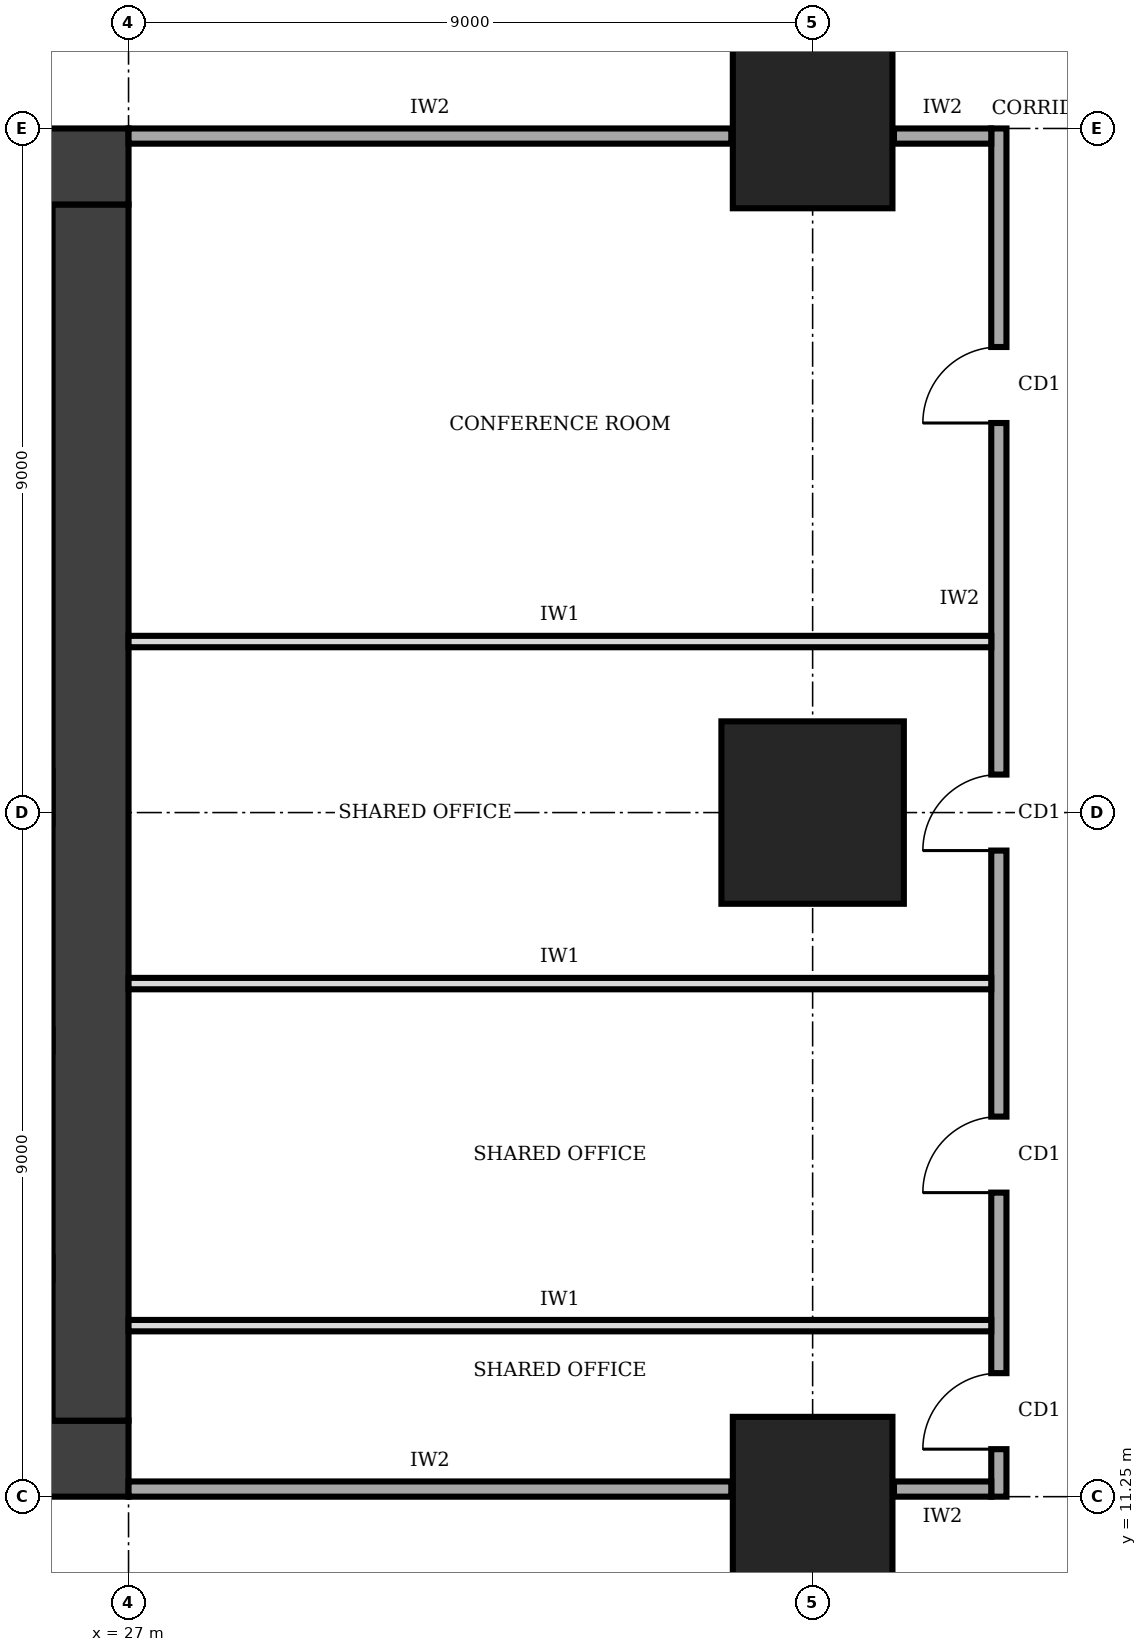
"""IFC4 building model, lengths in metres.
Left out: names, types, materials, properties, quantities, classifications, styles, units other than length and angle.
Written with IfcOpenShell. Run it as: python <this file> out.ifc"""

import sys

from ifc_helpers import new_model, si_unit, direction, frame, frame_2d, origin, origin_2d, place, context, subcontext, project, spatial, rectangle, extrude, element, fill, save


model = new_model("IFC4")
c1 = context("Model", 3, precision=1e-05, world=origin(), true_north=direction((0.0, 1.0)))
c2 = subcontext(c1, "Body", "Model", "MODEL_VIEW")
j1 = project(units=[si_unit("LENGTHUNIT", "METRE"), si_unit("PLANEANGLEUNIT", "RADIAN")], contexts=[c1])
p1 = place(None, origin())
s1 = spatial("IfcSite", under=j1, at=p1, CompositionType="ELEMENT")
p2 = place(p1, origin())
s2 = spatial("IfcBuilding", under=s1, at=p2, CompositionType="ELEMENT")
p3 = place(p2, frame((0.0, 0.0, 157.0)))
s3 = spatial("IfcBuildingStorey", under=s2, at=p3, CompositionType="ELEMENT", Elevation=157.0)
p4 = place(p3, frame((13.5, 11.75, 0.0), z_axis=(0.0, 0.0, 1.0), x_axis=(1.0, 0.0, 0.0)))
e1 = element("IfcWall", 1, at=p4, inside=s3, PredefinedType="SHEAR", context=c2, shape_type="SweptSolid", body=[
    extrude(rectangle(XDim=13.5, YDim=1.0, at=frame_2d((6.75, 0.0))), origin(), (0.0, 0.0, 1.0), 4.0),
])
p5 = place(p4, frame((4.75, 0.0, 0.0)))
e2 = element("IfcOpeningElement", 2, at=p5, cuts=e1, PredefinedType="OPENING", context=c2, shape_type="SweptSolid", body=[
    extrude(rectangle(XDim=1.0, YDim=2.1, at=frame_2d((0.5, 1.05))), frame((0.0, 0.51, 0.0), z_axis=(0.0, -1.0, 0.0), x_axis=(1.0, 0.0, 0.0)), (0.0, 0.0, 1.0), 1.02),
])
p6 = place(p3, frame((26.5, 12.25, 0.0), z_axis=(0.0, 0.0, 1.0), x_axis=(0.0, 1.0, 0.0)))
e3 = element("IfcWall", 3, at=p6, inside=s3, PredefinedType="SHEAR", context=c2, shape_type="SweptSolid", body=[
    extrude(rectangle(XDim=16.0, YDim=1.0, at=frame_2d((8.0, 0.0))), origin(), (0.0, 0.0, 1.0), 4.0),
])
p7 = place(p3, frame((27.0, 28.75, 0.0), z_axis=(0.0, 0.0, 1.0), x_axis=(-1.0, 0.0, 0.0)))
e4 = element("IfcWall", 4, at=p7, inside=s3, PredefinedType="SHEAR", context=c2, shape_type="SweptSolid", body=[
    extrude(rectangle(XDim=13.5, YDim=1.0, at=frame_2d((6.75, 0.0))), origin(), (0.0, 0.0, 1.0), 4.0),
])
p8 = place(p7, frame((4.75, 0.0, 0.0)))
e5 = element("IfcOpeningElement", 5, at=p8, cuts=e4, PredefinedType="OPENING", context=c2, shape_type="SweptSolid", body=[
    extrude(rectangle(XDim=1.8, YDim=2.1, at=frame_2d((0.9, 1.05))), frame((0.0, 0.51, 0.0), z_axis=(0.0, -1.0, 0.0), x_axis=(1.0, 0.0, 0.0)), (0.0, 0.0, 1.0), 1.02),
])
p9 = place(p3, frame((36.0, 11.25, 0.0), z_axis=(0.0, 0.0, 1.0), x_axis=(1.0, 0.0, 0.0)))
e6 = element("IfcColumn", 6, at=p9, inside=s3, PredefinedType="COLUMN", context=c2, shape_type="SweptSolid", body=[
    extrude(rectangle(XDim=2.1, YDim=2.1, at=origin_2d()), origin(), (0.0, 0.0, 1.0), 4.0),
])
p10 = place(p3, frame((36.0, 20.25, 0.0), z_axis=(0.0, 0.0, 1.0), x_axis=(1.0, 0.0, 0.0)))
e7 = element("IfcColumn", 7, at=p10, inside=s3, PredefinedType="COLUMN", context=c2, shape_type="SweptSolid", body=[
    extrude(rectangle(XDim=2.4, YDim=2.4, at=origin_2d()), origin(), (0.0, 0.0, 1.0), 4.0),
])
p11 = place(p3, frame((36.0, 29.25, 0.0), z_axis=(0.0, 0.0, 1.0), x_axis=(1.0, 0.0, 0.0)))
e8 = element("IfcColumn", 8, at=p11, inside=s3, PredefinedType="COLUMN", context=c2, shape_type="SweptSolid", body=[
    extrude(rectangle(XDim=2.1, YDim=2.1, at=origin_2d()), origin(), (0.0, 0.0, 1.0), 4.0),
])
p12 = place(p3, frame((38.45, 11.25, 0.0), z_axis=(0.0, 0.0, 1.0), x_axis=(0.0, 1.0, 0.0)))
e9 = element("IfcWall", 9, at=p12, inside=s3, PredefinedType="SOLIDWALL", context=c2, shape_type="SweptSolid", body=[
    extrude(rectangle(XDim=18.0, YDim=0.2, at=frame_2d((9.0, 0.0))), origin(), (0.0, 0.0, 1.0), 3.75),
])
p13 = place(p12, frame((0.625, 0.0, 0.0)))
e10 = element("IfcOpeningElement", 10, at=p13, cuts=e9, PredefinedType="OPENING", context=c2, shape_type="SweptSolid", body=[
    extrude(rectangle(XDim=1.0, YDim=2.1, at=frame_2d((0.5, 1.05))), frame((0.0, 0.11, 0.0), z_axis=(0.0, -1.0, 0.0), x_axis=(1.0, 0.0, 0.0)), (0.0, 0.0, 1.0), 0.22),
])
p14 = place(p12, frame((4.0, 0.0, 0.0)))
e11 = element("IfcOpeningElement", 11, at=p14, cuts=e9, PredefinedType="OPENING", context=c2, shape_type="SweptSolid", body=[
    extrude(rectangle(XDim=1.0, YDim=2.1, at=frame_2d((0.5, 1.05))), frame((0.0, 0.11, 0.0), z_axis=(0.0, -1.0, 0.0), x_axis=(1.0, 0.0, 0.0)), (0.0, 0.0, 1.0), 0.22),
])
p15 = place(p12, frame((8.5, 0.0, 0.0)))
e12 = element("IfcOpeningElement", 12, at=p15, cuts=e9, PredefinedType="OPENING", context=c2, shape_type="SweptSolid", body=[
    extrude(rectangle(XDim=1.0, YDim=2.1, at=frame_2d((0.5, 1.05))), frame((0.0, 0.11, 0.0), z_axis=(0.0, -1.0, 0.0), x_axis=(1.0, 0.0, 0.0)), (0.0, 0.0, 1.0), 0.22),
])
p16 = place(p12, frame((14.125, 0.0, 0.0)))
e13 = element("IfcOpeningElement", 13, at=p16, cuts=e9, PredefinedType="OPENING", context=c2, shape_type="SweptSolid", body=[
    extrude(rectangle(XDim=1.0, YDim=2.1, at=frame_2d((0.5, 1.05))), frame((0.0, 0.11, 0.0), z_axis=(0.0, -1.0, 0.0), x_axis=(1.0, 0.0, 0.0)), (0.0, 0.0, 1.0), 0.22),
])
p17 = place(p3, frame((27.0, 11.35, 0.0), z_axis=(0.0, 0.0, 1.0), x_axis=(1.0, 0.0, 0.0)))
e14 = element("IfcWall", 14, at=p17, inside=s3, PredefinedType="SOLIDWALL", context=c2, shape_type="SweptSolid", body=[
    extrude(rectangle(XDim=7.93, YDim=0.2, at=frame_2d((3.965, 0.0))), origin(), (0.0, 0.0, 1.0), 2.85),
])
p18 = place(p3, frame((37.07, 11.35, 0.0), z_axis=(0.0, 0.0, 1.0), x_axis=(1.0, 0.0, 0.0)))
e15 = element("IfcWall", 15, at=p18, inside=s3, PredefinedType="SOLIDWALL", context=c2, shape_type="SweptSolid", body=[
    extrude(rectangle(XDim=1.28, YDim=0.2, at=frame_2d((0.64, 0.0))), origin(), (0.0, 0.0, 1.0), 2.85),
])
p19 = place(p3, frame((27.0, 29.15, 0.0), z_axis=(0.0, 0.0, 1.0), x_axis=(1.0, 0.0, 0.0)))
e16 = element("IfcWall", 16, at=p19, inside=s3, PredefinedType="SOLIDWALL", context=c2, shape_type="SweptSolid", body=[
    extrude(rectangle(XDim=7.93, YDim=0.2, at=frame_2d((3.965, 0.0))), origin(), (0.0, 0.0, 1.0), 2.85),
])
p20 = place(p3, frame((37.07, 29.15, 0.0), z_axis=(0.0, 0.0, 1.0), x_axis=(1.0, 0.0, 0.0)))
e17 = element("IfcWall", 17, at=p20, inside=s3, PredefinedType="SOLIDWALL", context=c2, shape_type="SweptSolid", body=[
    extrude(rectangle(XDim=1.28, YDim=0.2, at=frame_2d((0.64, 0.0))), origin(), (0.0, 0.0, 1.0), 2.85),
])
for number, where, z_axis, x_axis in (
    (18, (27.0, 13.5, 0.0), (0.0, 0.0, 1.0), (1.0, 0.0, 0.0)),
    (19, (27.0, 18.0, 0.0), (0.0, 0.0, 1.0), (1.0, 0.0, 0.0)),
    (20, (27.0, 22.5, 0.0), (0.0, 0.0, 1.0), (1.0, 0.0, 0.0)),
):
    element("IfcWall", number, at=place(p3, frame(where, z_axis=z_axis, x_axis=x_axis)), inside=s3, PredefinedType="PARTITIONING", context=c2, shape_type="SweptSolid", body=[
        extrude(rectangle(XDim=11.35, YDim=0.15, at=frame_2d((5.675, 0.0))), origin(), (0.0, 0.0, 1.0), 3.75),
    ])
p21 = place(p13, origin())
e21 = element("IfcDoor", 21, at=p21, inside=s3, OperationType="SINGLE_SWING_LEFT", PredefinedType="DOOR", context=c2, shape_type="SweptSolid", body=[
    extrude(rectangle(XDim=1.0, YDim=2.1, at=frame_2d((0.5, 1.05))), frame((0.0, 0.025, 0.0), z_axis=(0.0, -1.0, 0.0), x_axis=(1.0, 0.0, 0.0)), (0.0, 0.0, 1.0), 0.05),
])
fill(e10, e21)
p22 = place(p14, origin())
e22 = element("IfcDoor", 22, at=p22, inside=s3, OperationType="SINGLE_SWING_LEFT", PredefinedType="DOOR", context=c2, shape_type="SweptSolid", body=[
    extrude(rectangle(XDim=1.0, YDim=2.1, at=frame_2d((0.5, 1.05))), frame((0.0, 0.025, 0.0), z_axis=(0.0, -1.0, 0.0), x_axis=(1.0, 0.0, 0.0)), (0.0, 0.0, 1.0), 0.05),
])
fill(e11, e22)
p23 = place(p15, origin())
e23 = element("IfcDoor", 23, at=p23, inside=s3, OperationType="SINGLE_SWING_LEFT", PredefinedType="DOOR", context=c2, shape_type="SweptSolid", body=[
    extrude(rectangle(XDim=1.0, YDim=2.1, at=frame_2d((0.5, 1.05))), frame((0.0, 0.025, 0.0), z_axis=(0.0, -1.0, 0.0), x_axis=(1.0, 0.0, 0.0)), (0.0, 0.0, 1.0), 0.05),
])
fill(e12, e23)
p24 = place(p16, origin())
e24 = element("IfcDoor", 24, at=p24, inside=s3, OperationType="SINGLE_SWING_LEFT", PredefinedType="DOOR", context=c2, shape_type="SweptSolid", body=[
    extrude(rectangle(XDim=1.0, YDim=2.1, at=frame_2d((0.5, 1.05))), frame((0.0, 0.025, 0.0), z_axis=(0.0, -1.0, 0.0), x_axis=(1.0, 0.0, 0.0)), (0.0, 0.0, 1.0), 0.05),
])
fill(e13, e24)
save(model, sys.argv[1])
